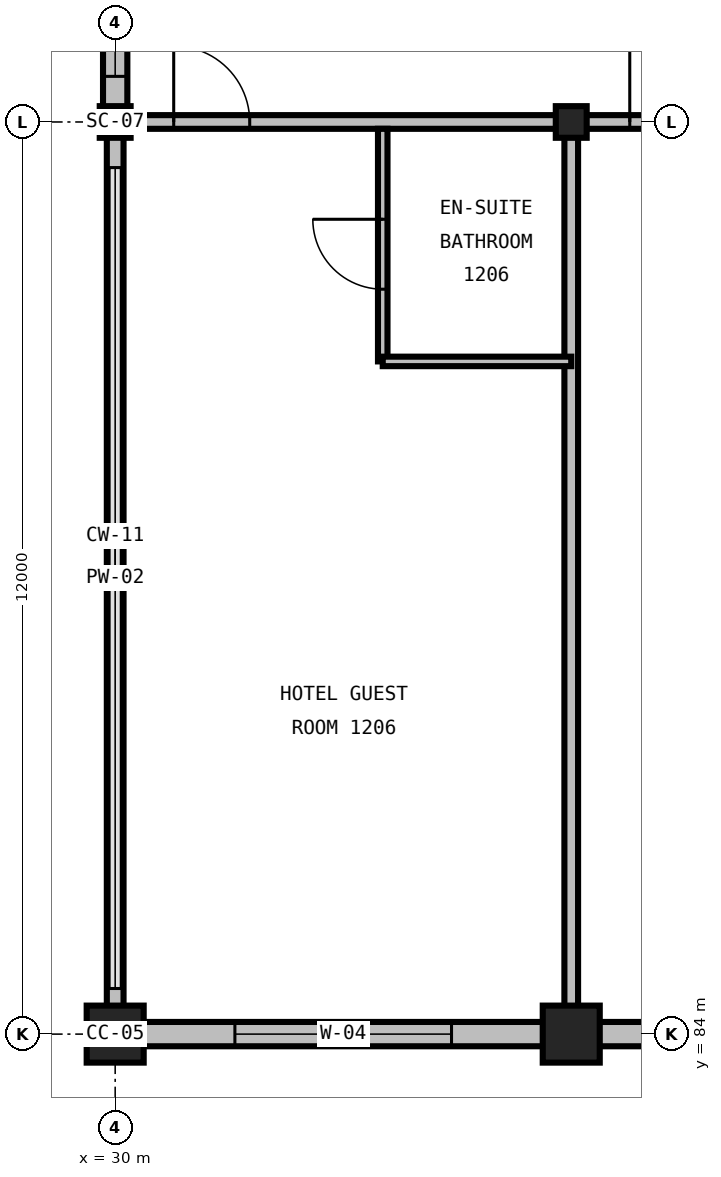
"""IFC4 building model, lengths in metres.
Left out: names, types, materials, properties, quantities, classifications, styles, units other than length and angle.
Written with IfcOpenShell. Run it as: python <this file> out.ifc"""

import sys

from ifc_helpers import new_model, si_unit, direction, frame, frame_2d, origin, origin_2d, place, context, subcontext, project, spatial, rectangle, i_section, extrude, element, fill, save


model = new_model("IFC4")
c1 = context("Model", 3, precision=1e-05, world=origin(), true_north=direction((0.0, 1.0)))
c2 = subcontext(c1, "Body", "Model", "MODEL_VIEW")
j1 = project(units=[si_unit("LENGTHUNIT", "METRE"), si_unit("PLANEANGLEUNIT", "RADIAN")], contexts=[c1])
p1 = place(None, origin())
s1 = spatial("IfcSite", under=j1, at=p1, CompositionType="ELEMENT")
p2 = place(p1, origin())
s2 = spatial("IfcBuilding", under=s1, at=p2, CompositionType="ELEMENT")
p3 = place(p2, frame((0.0, 0.0, 52.8)))
s3 = spatial("IfcBuildingStorey", under=s2, at=p3, CompositionType="ELEMENT", Elevation=52.8)
p4 = place(p3, frame((30.0, 84.0, 0.0), z_axis=(0.0, 0.0, 1.0), x_axis=(1.0, 0.0, 0.0)))
e1 = element("IfcColumn", 1, at=p4, inside=s3, PredefinedType="COLUMN", context=c2, shape_type="SweptSolid", body=[
    extrude(rectangle(XDim=0.75, YDim=0.75, at=origin_2d()), origin(), (0.0, 0.0, 1.0), 3.6),
])
p5 = place(p3, frame((30.0, 96.0, 0.0), z_axis=(0.0, 0.0, 1.0), x_axis=(1.0, 0.0, 0.0)))
e2 = element("IfcColumn", 2, at=p5, inside=s3, PredefinedType="COLUMN", context=c2, shape_type="SweptSolid", body=[
    extrude(i_section(OverallWidth=0.406, OverallDepth=0.416, WebThickness=0.03, FlangeThickness=0.048, FilletRadius=0.031, at=origin_2d()), origin(), (0.0, 0.0, 1.0), 3.6),
])
p6 = place(p3, frame((36.0, 84.0, 0.0), z_axis=(0.0, 0.0, 1.0), x_axis=(1.0, 0.0, 0.0)))
e3 = element("IfcColumn", 3, at=p6, inside=s3, PredefinedType="COLUMN", context=c2, shape_type="SweptSolid", body=[
    extrude(rectangle(XDim=0.75, YDim=0.75, at=origin_2d()), origin(), (0.0, 0.0, 1.0), 3.6),
])
p7 = place(p3, frame((36.0, 96.0, 0.0), z_axis=(0.0, 0.0, 1.0), x_axis=(1.0, 0.0, 0.0)))
e4 = element("IfcColumn", 4, at=p7, inside=s3, PredefinedType="COLUMN", context=c2, shape_type="SweptSolid", body=[
    extrude(i_section(OverallWidth=0.406, OverallDepth=0.416, WebThickness=0.03, FlangeThickness=0.048, FilletRadius=0.031, at=origin_2d()), origin(), (0.0, 0.0, 1.0), 3.6),
])
p8 = place(p3, frame((30.0, 84.0, 0.0), z_axis=(0.0, 0.0, 1.0), x_axis=(1.0, 0.0, 0.0)))
e5 = element("IfcWall", 5, at=p8, inside=s3, PredefinedType="STANDARD", context=c2, shape_type="SweptSolid", body=[
    extrude(rectangle(XDim=6.0, YDim=0.32, at=frame_2d((3.0, 0.0))), origin(), (0.0, 0.0, 1.0), 2.536),
])
p9 = place(p8, frame((1.575, 0.0, 0.7)))
e6 = element("IfcOpeningElement", 6, at=p9, cuts=e5, PredefinedType="OPENING", context=c2, shape_type="SweptSolid", body=[
    extrude(rectangle(XDim=2.85, YDim=1.65, at=frame_2d((1.425, 0.825))), frame((0.0, 0.175, 0.0), z_axis=(0.0, -1.0, 0.0), x_axis=(1.0, 0.0, 0.0)), (0.0, 0.0, 1.0), 0.35),
])
p10 = place(p3, frame((36.0, 84.0, 0.0), z_axis=(0.0, 0.0, 1.0), x_axis=(1.0, 0.0, 0.0)))
e7 = element("IfcWall", 7, at=p10, inside=s3, PredefinedType="STANDARD", context=c2, shape_type="SweptSolid", body=[
    extrude(rectangle(XDim=6.0, YDim=0.32, at=frame_2d((3.0, 0.0))), origin(), (0.0, 0.0, 1.0), 2.536),
])
p11 = place(p10, frame((1.575, 0.0, 0.7)))
e8 = element("IfcOpeningElement", 8, at=p11, cuts=e7, PredefinedType="OPENING", context=c2, shape_type="SweptSolid", body=[
    extrude(rectangle(XDim=2.85, YDim=1.65, at=frame_2d((1.425, 0.825))), frame((0.0, 0.175, 0.0), z_axis=(0.0, -1.0, 0.0), x_axis=(1.0, 0.0, 0.0)), (0.0, 0.0, 1.0), 0.35),
])
p12 = place(p3, frame((30.0, 96.0, 0.0), z_axis=(0.0, 0.0, 1.0), x_axis=(0.0, -1.0, 0.0)))
e9 = element("IfcWall", 9, at=p12, inside=s3, PredefinedType="PARAPET", context=c2, shape_type="SweptSolid", body=[
    extrude(rectangle(XDim=12.0, YDim=0.22, at=frame_2d((6.0, 0.0))), origin(), (0.0, 0.0, 1.0), 0.2),
])
p13 = place(p3, frame((30.0, 105.0, 0.0), z_axis=(0.0, 0.0, 1.0), x_axis=(0.0, -1.0, 0.0)))
e10 = element("IfcWall", 10, at=p13, inside=s3, PredefinedType="STANDARD", context=c2, shape_type="SweptSolid", body=[
    extrude(rectangle(XDim=9.0, YDim=0.32, at=frame_2d((4.5, 0.0))), origin(), (0.0, 0.0, 1.0), 2.981),
])
p14 = place(p13, frame((6.6, 0.0, 0.85)))
e11 = element("IfcOpeningElement", 11, at=p14, cuts=e10, PredefinedType="OPENING", context=c2, shape_type="SweptSolid", body=[
    extrude(rectangle(XDim=1.8, YDim=1.5, at=frame_2d((0.9, 0.75))), frame((0.0, 0.175, 0.0), z_axis=(0.0, -1.0, 0.0), x_axis=(1.0, 0.0, 0.0)), (0.0, 0.0, 1.0), 0.35),
])
p15 = place(p3, frame((30.085, 96.0, 0.0), z_axis=(0.0, 0.0, 1.0), x_axis=(1.0, 0.0, 0.0)))
e12 = element("IfcWall", 12, at=p15, inside=s3, PredefinedType="PARTITIONING", context=c2, shape_type="SweptSolid", body=[
    extrude(rectangle(XDim=5.915, YDim=0.18, at=frame_2d((2.957, 0.0))), origin(), (0.0, 0.0, 1.0), 2.736),
])
p16 = place(p15, frame((0.685, 0.0, 0.0)))
e13 = element("IfcOpeningElement", 13, at=p16, cuts=e12, PredefinedType="OPENING", context=c2, shape_type="SweptSolid", body=[
    extrude(rectangle(XDim=1.0, YDim=2.15, at=frame_2d((0.5, 1.075))), frame((0.0, 0.105, 0.0), z_axis=(0.0, -1.0, 0.0), x_axis=(1.0, 0.0, 0.0)), (0.0, 0.0, 1.0), 0.21),
])
p17 = place(p3, frame((36.0, 84.16, 0.0), z_axis=(0.0, 0.0, 1.0), x_axis=(0.0, 1.0, 0.0)))
e14 = element("IfcWall", 14, at=p17, inside=s3, PredefinedType="PARTITIONING", context=c2, shape_type="SweptSolid", body=[
    extrude(rectangle(XDim=11.84, YDim=0.18, at=frame_2d((5.92, 0.0))), origin(), (0.0, 0.0, 1.0), 2.59),
])
p18 = place(p3, frame((33.52, 92.85, 0.0), z_axis=(0.0, 0.0, 1.0), x_axis=(0.0, 1.0, 0.0)))
e15 = element("IfcWall", 15, at=p18, inside=s3, PredefinedType="PARTITIONING", context=c2, shape_type="SweptSolid", body=[
    extrude(rectangle(XDim=3.06, YDim=0.125, at=frame_2d((1.53, 0.0))), origin(), (0.0, 0.0, 1.0), 3.29),
])
p19 = place(p18, frame((0.95, 0.0, 0.0)))
e16 = element("IfcOpeningElement", 16, at=p19, cuts=e15, PredefinedType="OPENING", context=c2, shape_type="SweptSolid", body=[
    extrude(rectangle(XDim=0.92, YDim=2.1, at=frame_2d((0.46, 1.05))), frame((0.0, 0.077, 0.0), z_axis=(0.0, -1.0, 0.0), x_axis=(1.0, 0.0, 0.0)), (0.0, 0.0, 1.0), 0.155),
])
p20 = place(p3, frame((33.52, 92.85, 0.0), z_axis=(0.0, 0.0, 1.0), x_axis=(1.0, 0.0, 0.0)))
e17 = element("IfcWall", 17, at=p20, inside=s3, PredefinedType="PARTITIONING", context=c2, shape_type="SweptSolid", body=[
    extrude(rectangle(XDim=2.48, YDim=0.125, at=frame_2d((1.24, 0.0))), origin(), (0.0, 0.0, 1.0), 3.29),
])
p21 = place(p3, frame((36.0, 96.0, 0.0), z_axis=(0.0, 0.0, 1.0), x_axis=(1.0, 0.0, 0.0)))
e18 = element("IfcWall", 18, at=p21, inside=s3, PredefinedType="PARTITIONING", context=c2, shape_type="SweptSolid", body=[
    extrude(rectangle(XDim=6.0, YDim=0.18, at=frame_2d((3.0, 0.0))), origin(), (0.0, 0.0, 1.0), 2.736),
])
p22 = place(p21, frame((0.77, 0.0, 0.0)))
e19 = element("IfcOpeningElement", 19, at=p22, cuts=e18, PredefinedType="OPENING", context=c2, shape_type="SweptSolid", body=[
    extrude(rectangle(XDim=1.0, YDim=2.15, at=frame_2d((0.5, 1.075))), frame((0.0, 0.105, 0.0), z_axis=(0.0, -1.0, 0.0), x_axis=(1.0, 0.0, 0.0)), (0.0, 0.0, 1.0), 0.21),
])
p23 = place(p9, origin())
e20 = element("IfcWindow", 20, at=p23, inside=s3, PartitioningType="TRIPLE_PANEL_VERTICAL", PredefinedType="WINDOW", context=c2, shape_type="SweptSolid", body=[
    extrude(rectangle(XDim=2.85, YDim=1.65, at=frame_2d((1.425, 0.825))), frame((0.0, 0.03, 0.0), z_axis=(0.0, -1.0, 0.0), x_axis=(1.0, 0.0, 0.0)), (0.0, 0.0, 1.0), 0.06),
])
fill(e6, e20)
p24 = place(p14, origin())
e21 = element("IfcWindow", 21, at=p24, inside=s3, PartitioningType="SINGLE_PANEL", PredefinedType="WINDOW", context=c2, shape_type="SweptSolid", body=[
    extrude(rectangle(XDim=1.8, YDim=1.5, at=frame_2d((0.9, 0.75))), frame((0.0, 0.03, 0.0), z_axis=(0.0, -1.0, 0.0), x_axis=(1.0, 0.0, 0.0)), (0.0, 0.0, 1.0), 0.06),
])
fill(e11, e21)
p25 = place(p16, origin())
e22 = element("IfcDoor", 22, at=p25, inside=s3, OperationType="SINGLE_SWING_LEFT", PredefinedType="DOOR", context=c2, shape_type="SweptSolid", body=[
    extrude(rectangle(XDim=1.0, YDim=2.15, at=frame_2d((0.5, 1.075))), frame((0.0, 0.025, 0.0), z_axis=(0.0, -1.0, 0.0), x_axis=(1.0, 0.0, 0.0)), (0.0, 0.0, 1.0), 0.05),
])
fill(e13, e22)
p26 = place(p19, origin())
e23 = element("IfcDoor", 23, at=p26, inside=s3, OperationType="SINGLE_SWING_RIGHT", PredefinedType="DOOR", context=c2, shape_type="SweptSolid", body=[
    extrude(rectangle(XDim=0.92, YDim=2.1, at=frame_2d((0.46, 1.05))), frame((0.0, 0.025, 0.0), z_axis=(0.0, -1.0, 0.0), x_axis=(1.0, 0.0, 0.0)), (0.0, 0.0, 1.0), 0.05),
])
fill(e16, e23)
p27 = place(p22, origin())
e24 = element("IfcDoor", 24, at=p27, inside=s3, OperationType="SINGLE_SWING_LEFT", PredefinedType="DOOR", context=c2, shape_type="SweptSolid", body=[
    extrude(rectangle(XDim=1.0, YDim=2.15, at=frame_2d((0.5, 1.075))), frame((0.0, 0.025, 0.0), z_axis=(0.0, -1.0, 0.0), x_axis=(1.0, 0.0, 0.0)), (0.0, 0.0, 1.0), 0.05),
])
fill(e19, e24)
save(model, sys.argv[1])
